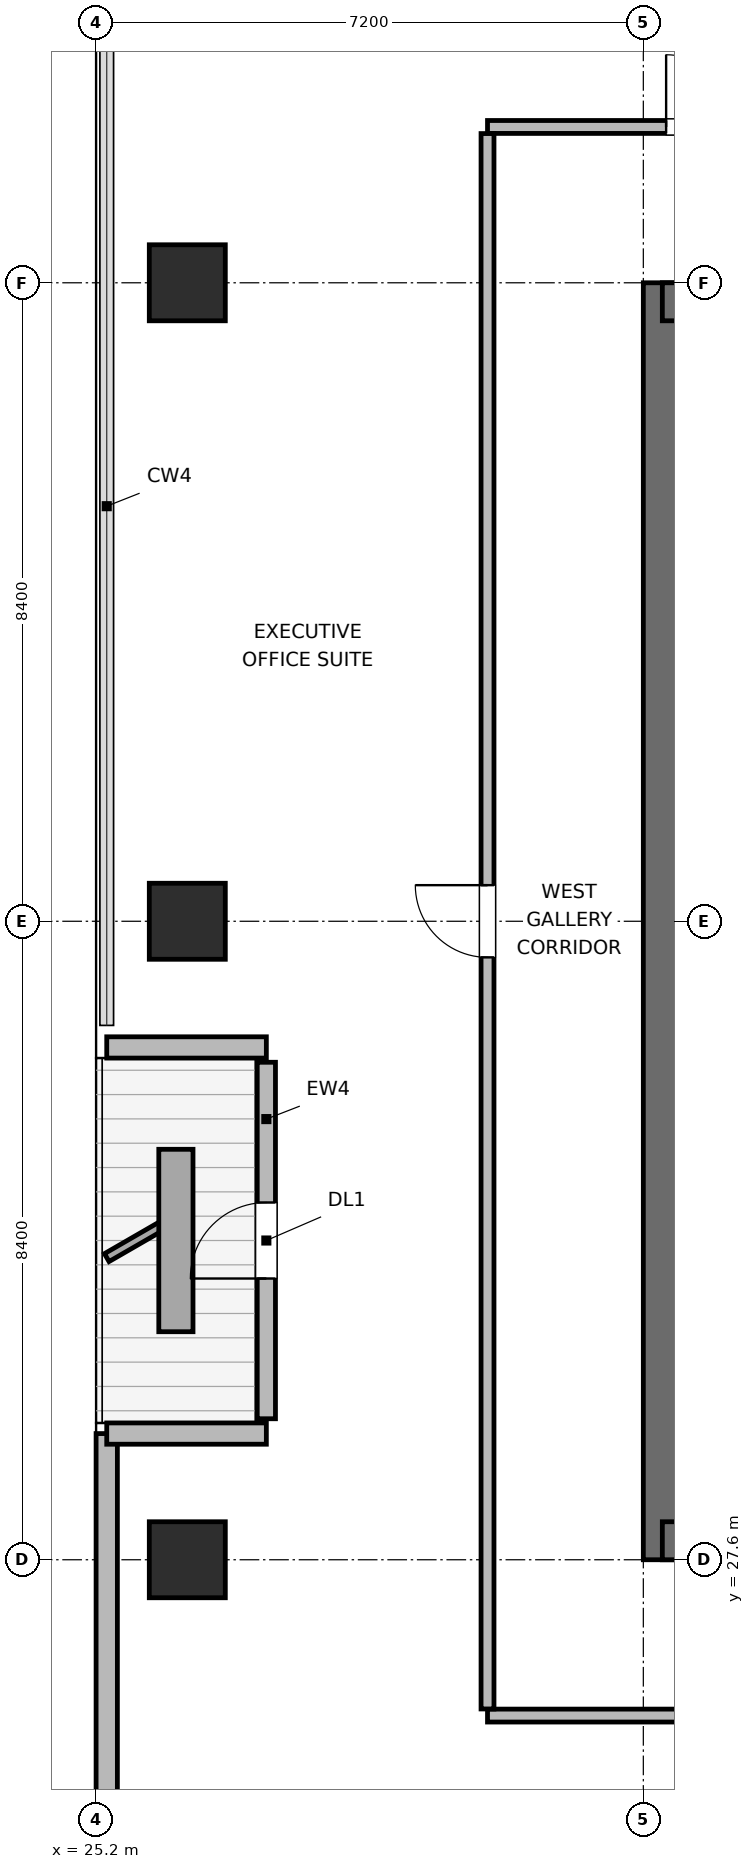
"""IFC4 building model, lengths in metres.
Left out: names, types, materials, properties, quantities, classifications, styles, units other than length and angle.
Written with IfcOpenShell. Run it as: python <this file> out.ifc"""

import sys

from ifc_helpers import new_model, si_unit, direction, frame, frame_2d, origin, origin_2d, place, context, subcontext, project, spatial, rectangle, extrude, element, fill, save


model = new_model("IFC4")
c1 = context("Model", 3, precision=1e-05, world=origin(), true_north=direction((0.0, 1.0)))
c2 = subcontext(c1, "Body", "Model", "MODEL_VIEW")
j1 = project(units=[si_unit("LENGTHUNIT", "METRE"), si_unit("PLANEANGLEUNIT", "RADIAN")], contexts=[c1])
p1 = place(None, origin())
s1 = spatial("IfcSite", under=j1, at=p1, CompositionType="ELEMENT")
p2 = place(p1, origin())
s2 = spatial("IfcBuilding", under=s1, at=p2, CompositionType="ELEMENT")
p3 = place(p2, frame((0.0, 0.0, 270.6)))
s3 = spatial("IfcBuildingStorey", under=s2, at=p3, CompositionType="ELEMENT", Elevation=270.6)
p4 = place(p3, frame((32.65, 27.6, 0.0), z_axis=(0.0, 0.0, 1.0), x_axis=(0.0, 1.0, 0.0)))
e1 = element("IfcWall", 1, at=p4, inside=s3, PredefinedType="SHEAR", context=c2, shape_type="SweptSolid", body=[
    extrude(rectangle(XDim=16.8, YDim=0.5, at=frame_2d((8.4, 0.0))), origin(), (0.0, 0.0, 1.0), 3.9),
])
p5 = place(p3, frame((32.65, 27.85, 0.0), z_axis=(0.0, 0.0, 1.0), x_axis=(1.0, 0.0, 0.0)))
e2 = element("IfcWall", 2, at=p5, inside=s3, PredefinedType="SHEAR", context=c2, shape_type="SweptSolid", body=[
    extrude(rectangle(XDim=9.5, YDim=0.5, at=frame_2d((4.75, 0.0))), origin(), (0.0, 0.0, 1.0), 3.9),
])
p6 = place(p5, frame((5.075, 0.0, 0.0)))
e3 = element("IfcOpeningElement", 3, at=p6, cuts=e2, PredefinedType="OPENING", context=c2, shape_type="SweptSolid", body=[
    extrude(rectangle(XDim=1.05, YDim=2.04, at=frame_2d((0.525, 1.02))), frame((0.0, 0.26, 0.0), z_axis=(0.0, -1.0, 0.0), x_axis=(1.0, 0.0, 0.0)), (0.0, 0.0, 1.0), 0.52),
])
p7 = place(p3, frame((32.65, 44.15, 0.0), z_axis=(0.0, 0.0, 1.0), x_axis=(1.0, 0.0, 0.0)))
e4 = element("IfcWall", 4, at=p7, inside=s3, PredefinedType="SHEAR", context=c2, shape_type="SweptSolid", body=[
    extrude(rectangle(XDim=9.5, YDim=0.5, at=frame_2d((4.75, 0.0))), origin(), (0.0, 0.0, 1.0), 3.9),
])
p8 = place(p7, frame((1.075, 0.0, 0.0)))
e5 = element("IfcOpeningElement", 5, at=p8, cuts=e4, PredefinedType="OPENING", context=c2, shape_type="SweptSolid", body=[
    extrude(rectangle(XDim=0.95, YDim=2.04, at=frame_2d((0.475, 1.02))), frame((0.0, 0.26, 0.0), z_axis=(0.0, -1.0, 0.0), x_axis=(1.0, 0.0, 0.0)), (0.0, 0.0, 1.0), 0.52),
])
p9 = place(p7, frame((4.325, 0.0, 0.0)))
e6 = element("IfcOpeningElement", 6, at=p9, cuts=e4, PredefinedType="OPENING", context=c2, shape_type="SweptSolid", body=[
    extrude(rectangle(XDim=0.9, YDim=2.02, at=frame_2d((0.45, 1.01))), frame((0.0, 0.26, 0.0), z_axis=(0.0, -1.0, 0.0), x_axis=(1.0, 0.0, 0.0)), (0.0, 0.0, 1.0), 0.52),
])
p10 = place(p7, frame((7.225, 0.0, 0.0)))
e7 = element("IfcOpeningElement", 7, at=p10, cuts=e4, PredefinedType="OPENING", context=c2, shape_type="SweptSolid", body=[
    extrude(rectangle(XDim=0.9, YDim=2.02, at=frame_2d((0.45, 1.01))), frame((0.0, 0.26, 0.0), z_axis=(0.0, -1.0, 0.0), x_axis=(1.0, 0.0, 0.0)), (0.0, 0.0, 1.0), 0.52),
])
for number, where, z_axis, x_axis in (
    (8, (26.4, 27.6, 0.0), (0.0, 0.0, 1.0), (1.0, 0.0, 0.0)),
    (9, (26.4, 36.0, 0.0), (0.0, 0.0, 1.0), (1.0, 0.0, 0.0)),
    (10, (26.4, 44.4, 0.0), (0.0, 0.0, 1.0), (1.0, 0.0, 0.0)),
):
    element("IfcColumn", number, at=place(p3, frame(where, z_axis=z_axis, x_axis=x_axis)), inside=s3, PredefinedType="COLUMN", context=c2, shape_type="SweptSolid", body=[
        extrude(rectangle(XDim=1.0, YDim=1.0, at=origin_2d()), origin(), (0.0, 0.0, 1.0), 3.9),
    ])
p11 = place(p3, frame((25.34, 23.418, 0.0), z_axis=(0.0, 0.0, 1.0), x_axis=(0.0, 1.0, 0.0)))
e11 = element("IfcWall", 11, at=p11, inside=s3, PredefinedType="SOLIDWALL", context=c2, shape_type="SweptSolid", body=[
    extrude(rectangle(XDim=5.842, YDim=0.28, at=frame_2d((2.921, 0.0))), origin(), (0.0, 0.0, 1.0), 3.68),
])
p12 = place(p3, frame((25.34, 29.26, 0.0), z_axis=(0.0, 0.0, 1.0), x_axis=(1.0, 0.0, 0.0)))
e12 = element("IfcWall", 12, at=p12, inside=s3, PredefinedType="SOLIDWALL", context=c2, shape_type="SweptSolid", body=[
    extrude(rectangle(XDim=2.1, YDim=0.28, at=frame_2d((1.05, 0.0))), origin(), (0.0, 0.0, 1.0), 3.126),
])
p13 = place(p3, frame((27.44, 29.455, 0.0), z_axis=(0.0, 0.0, 1.0), x_axis=(0.0, 1.0, 0.0)))
e13 = element("IfcWall", 13, at=p13, inside=s3, PredefinedType="SOLIDWALL", context=c2, shape_type="SweptSolid", body=[
    extrude(rectangle(XDim=4.69, YDim=0.24, at=frame_2d((2.345, 0.0))), origin(), (0.0, 0.0, 1.0), 3.311),
])
p14 = place(p13, frame((1.845, 0.0, 0.0)))
e14 = element("IfcOpeningElement", 14, at=p14, cuts=e13, PredefinedType="OPENING", context=c2, shape_type="SweptSolid", body=[
    extrude(rectangle(XDim=1.0, YDim=2.02, at=frame_2d((0.5, 1.01))), frame((0.0, 0.13, 0.0), z_axis=(0.0, -1.0, 0.0), x_axis=(1.0, 0.0, 0.0)), (0.0, 0.0, 1.0), 0.26),
])
p15 = place(p3, frame((27.44, 34.34, 0.0), z_axis=(0.0, 0.0, 1.0), x_axis=(-1.0, 0.0, 0.0)))
e15 = element("IfcWall", 15, at=p15, inside=s3, PredefinedType="SOLIDWALL", context=c2, shape_type="SweptSolid", body=[
    extrude(rectangle(XDim=2.1, YDim=0.28, at=frame_2d((1.05, 0.0))), origin(), (0.0, 0.0, 1.0), 3.126),
])
p16 = place(p3, frame((30.35, 25.55, 0.0), z_axis=(0.0, 0.0, 1.0), x_axis=(1.0, 0.0, 0.0)))
e16 = element("IfcWall", 16, at=p16, inside=s3, PredefinedType="PARTITIONING", context=c2, shape_type="SweptSolid", body=[
    extrude(rectangle(XDim=33.25, YDim=0.17, at=frame_2d((16.625, 0.0))), origin(), (0.0, 0.0, 1.0), 3.68),
])
p17 = place(p16, frame((5.95, 0.0, 0.0)))
e17 = element("IfcOpeningElement", 17, at=p17, cuts=e16, PredefinedType="OPENING", context=c2, shape_type="SweptSolid", body=[
    extrude(rectangle(XDim=0.95, YDim=2.04, at=frame_2d((0.475, 1.02))), frame((0.0, 0.095, 0.0), z_axis=(0.0, -1.0, 0.0), x_axis=(1.0, 0.0, 0.0)), (0.0, 0.0, 1.0), 0.19),
])
p18 = place(p16, frame((22.575, 0.0, 0.0)))
e18 = element("IfcOpeningElement", 18, at=p18, cuts=e16, PredefinedType="OPENING", context=c2, shape_type="SweptSolid", body=[
    extrude(rectangle(XDim=0.95, YDim=2.04, at=frame_2d((0.475, 1.02))), frame((0.0, 0.095, 0.0), z_axis=(0.0, -1.0, 0.0), x_axis=(1.0, 0.0, 0.0)), (0.0, 0.0, 1.0), 0.19),
])
p19 = place(p3, frame((30.35, 46.45, 0.0), z_axis=(0.0, 0.0, 1.0), x_axis=(1.0, 0.0, 0.0)))
e19 = element("IfcWall", 19, at=p19, inside=s3, PredefinedType="PARTITIONING", context=c2, shape_type="SweptSolid", body=[
    extrude(rectangle(XDim=33.25, YDim=0.17, at=frame_2d((16.625, 0.0))), origin(), (0.0, 0.0, 1.0), 3.68),
])
p20 = place(p19, frame((2.35, 0.0, 0.0)))
e20 = element("IfcOpeningElement", 20, at=p20, cuts=e19, PredefinedType="OPENING", context=c2, shape_type="SweptSolid", body=[
    extrude(rectangle(XDim=0.95, YDim=2.04, at=frame_2d((0.475, 1.02))), frame((0.0, 0.095, 0.0), z_axis=(0.0, -1.0, 0.0), x_axis=(1.0, 0.0, 0.0)), (0.0, 0.0, 1.0), 0.19),
])
p21 = place(p19, frame((7.275, 0.0, 0.0)))
e21 = element("IfcOpeningElement", 21, at=p21, cuts=e19, PredefinedType="OPENING", context=c2, shape_type="SweptSolid", body=[
    extrude(rectangle(XDim=0.95, YDim=2.04, at=frame_2d((0.475, 1.02))), frame((0.0, 0.095, 0.0), z_axis=(0.0, -1.0, 0.0), x_axis=(1.0, 0.0, 0.0)), (0.0, 0.0, 1.0), 0.19),
])
p22 = place(p19, frame((12.475, 0.0, 0.0)))
e22 = element("IfcOpeningElement", 22, at=p22, cuts=e19, PredefinedType="OPENING", context=c2, shape_type="SweptSolid", body=[
    extrude(rectangle(XDim=0.95, YDim=2.04, at=frame_2d((0.475, 1.02))), frame((0.0, 0.095, 0.0), z_axis=(0.0, -1.0, 0.0), x_axis=(1.0, 0.0, 0.0)), (0.0, 0.0, 1.0), 0.19),
])
p23 = place(p19, frame((18.175, 0.0, 0.0)))
e23 = element("IfcOpeningElement", 23, at=p23, cuts=e19, PredefinedType="OPENING", context=c2, shape_type="SweptSolid", body=[
    extrude(rectangle(XDim=0.95, YDim=2.04, at=frame_2d((0.475, 1.02))), frame((0.0, 0.095, 0.0), z_axis=(0.0, -1.0, 0.0), x_axis=(1.0, 0.0, 0.0)), (0.0, 0.0, 1.0), 0.19),
])
p24 = place(p19, frame((23.175, 0.0, 0.0)))
e24 = element("IfcOpeningElement", 24, at=p24, cuts=e19, PredefinedType="OPENING", context=c2, shape_type="SweptSolid", body=[
    extrude(rectangle(XDim=0.95, YDim=2.04, at=frame_2d((0.475, 1.02))), frame((0.0, 0.095, 0.0), z_axis=(0.0, -1.0, 0.0), x_axis=(1.0, 0.0, 0.0)), (0.0, 0.0, 1.0), 0.19),
])
p25 = place(p19, frame((27.675, 0.0, 0.0)))
e25 = element("IfcOpeningElement", 25, at=p25, cuts=e19, PredefinedType="OPENING", context=c2, shape_type="SweptSolid", body=[
    extrude(rectangle(XDim=0.95, YDim=2.04, at=frame_2d((0.475, 1.02))), frame((0.0, 0.095, 0.0), z_axis=(0.0, -1.0, 0.0), x_axis=(1.0, 0.0, 0.0)), (0.0, 0.0, 1.0), 0.19),
])
p26 = place(p19, frame((31.275, 0.0, 0.0)))
e26 = element("IfcOpeningElement", 26, at=p26, cuts=e19, PredefinedType="OPENING", context=c2, shape_type="SweptSolid", body=[
    extrude(rectangle(XDim=0.95, YDim=2.04, at=frame_2d((0.475, 1.02))), frame((0.0, 0.095, 0.0), z_axis=(0.0, -1.0, 0.0), x_axis=(1.0, 0.0, 0.0)), (0.0, 0.0, 1.0), 0.19),
])
p27 = place(p3, frame((30.35, 25.637, 0.0), z_axis=(0.0, 0.0, 1.0), x_axis=(0.0, 1.0, 0.0)))
e27 = element("IfcWall", 27, at=p27, inside=s3, PredefinedType="PARTITIONING", context=c2, shape_type="SweptSolid", body=[
    extrude(rectangle(XDim=20.726, YDim=0.17, at=frame_2d((10.363, 0.0))), origin(), (0.0, 0.0, 1.0), 3.68),
])
p28 = place(p27, frame((9.888, 0.0, 0.0)))
e28 = element("IfcOpeningElement", 28, at=p28, cuts=e27, PredefinedType="OPENING", context=c2, shape_type="SweptSolid", body=[
    extrude(rectangle(XDim=0.95, YDim=2.04, at=frame_2d((0.475, 1.02))), frame((0.0, 0.095, 0.0), z_axis=(0.0, -1.0, 0.0), x_axis=(1.0, 0.0, 0.0)), (0.0, 0.0, 1.0), 0.19),
])
p29 = place(p14, origin())
e29 = element("IfcDoor", 29, at=p29, inside=s3, OperationType="SINGLE_SWING_LEFT", PredefinedType="DOOR", context=c2, shape_type="SweptSolid", body=[
    extrude(rectangle(XDim=1.0, YDim=2.02, at=frame_2d((0.5, 1.01))), frame((0.0, 0.025, 0.0), z_axis=(0.0, -1.0, 0.0), x_axis=(1.0, 0.0, 0.0)), (0.0, 0.0, 1.0), 0.05),
])
fill(e14, e29)
p30 = place(p20, origin())
e30 = element("IfcDoor", 30, at=p30, inside=s3, OperationType="SINGLE_SWING_LEFT", PredefinedType="DOOR", context=c2, shape_type="SweptSolid", body=[
    extrude(rectangle(XDim=0.95, YDim=2.04, at=frame_2d((0.475, 1.02))), frame((0.0, 0.025, 0.0), z_axis=(0.0, -1.0, 0.0), x_axis=(1.0, 0.0, 0.0)), (0.0, 0.0, 1.0), 0.05),
])
fill(e20, e30)
p31 = place(p28, origin())
e31 = element("IfcDoor", 31, at=p31, inside=s3, OperationType="SINGLE_SWING_RIGHT", PredefinedType="DOOR", context=c2, shape_type="SweptSolid", body=[
    extrude(rectangle(XDim=0.95, YDim=2.04, at=frame_2d((0.475, 1.02))), frame((0.0, 0.025, 0.0), z_axis=(0.0, -1.0, 0.0), x_axis=(1.0, 0.0, 0.0)), (0.0, 0.0, 1.0), 0.05),
])
fill(e28, e31)
save(model, sys.argv[1])
